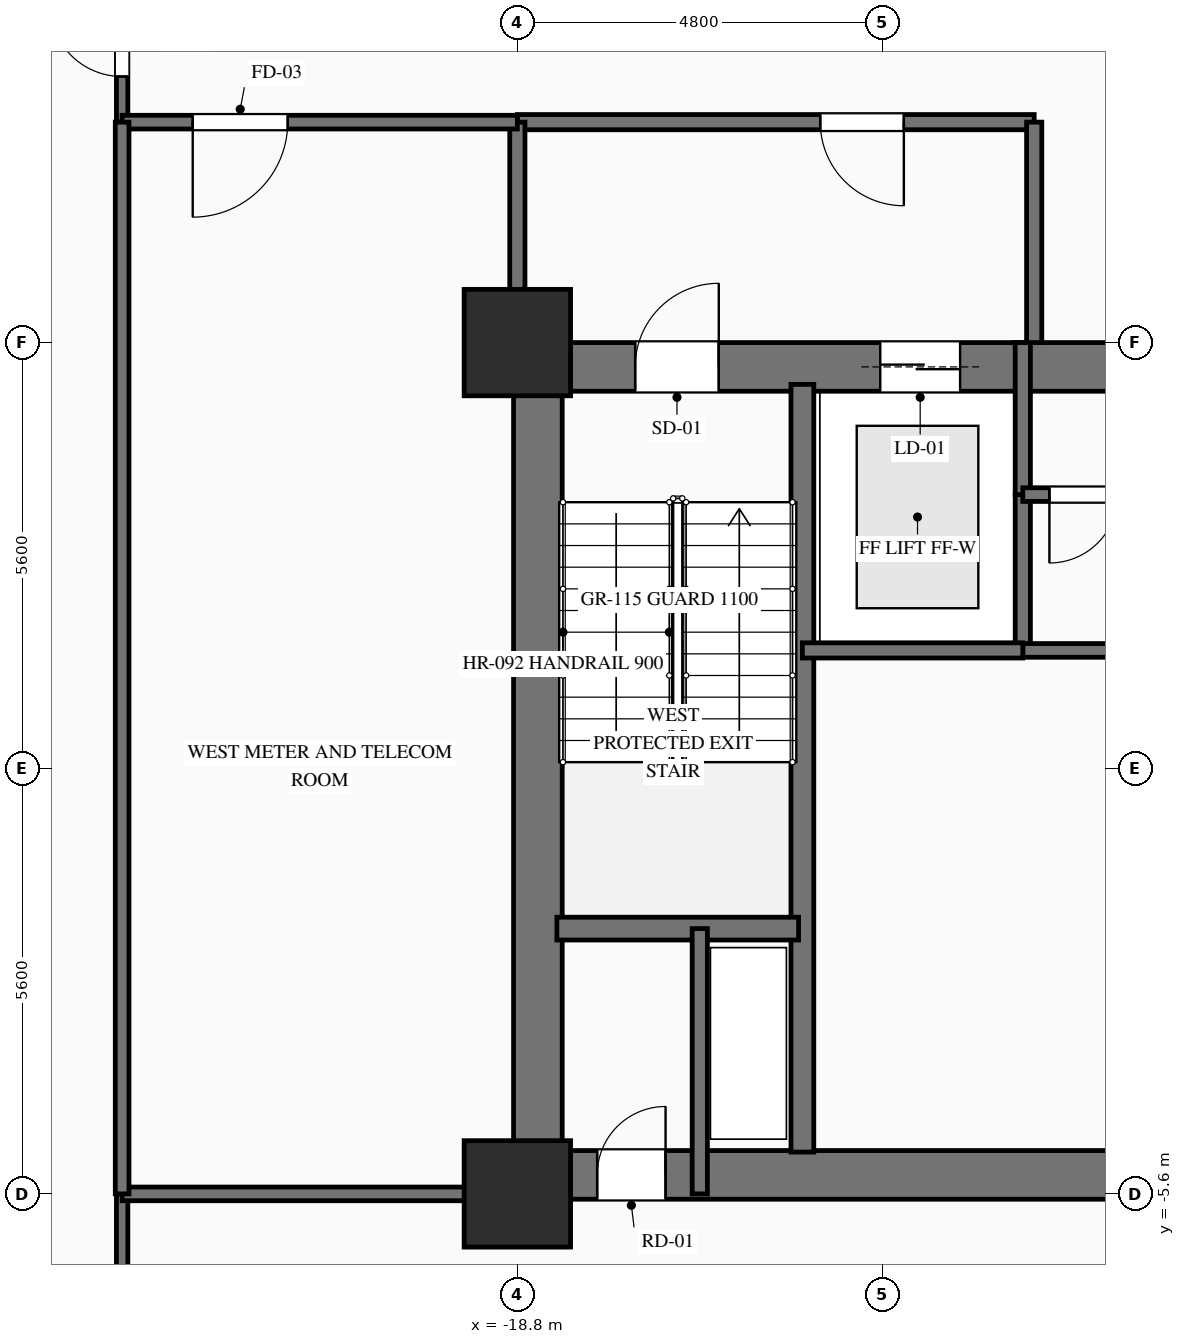
"""IFC4 building model, lengths in metres.
Left out: names, types, materials, properties, quantities, classifications, styles, units other than length and angle.
Written with IfcOpenShell. Run it as: python <this file> out.ifc"""

import sys

from ifc_helpers import new_model, si_unit, direction, frame, frame_2d, origin, origin_2d, place, context, subcontext, project, spatial, rectangle, extrude, element, fill, save


model = new_model("IFC4")
c1 = context("Model", 3, precision=1e-05, world=origin(), true_north=direction((0.0, 1.0)))
c2 = subcontext(c1, "Body", "Model", "MODEL_VIEW")
j1 = project(units=[si_unit("LENGTHUNIT", "METRE"), si_unit("PLANEANGLEUNIT", "RADIAN")], contexts=[c1])
p1 = place(None, origin())
s1 = spatial("IfcSite", under=j1, at=p1, CompositionType="ELEMENT")
p2 = place(p1, origin())
s2 = spatial("IfcBuilding", under=s1, at=p2, CompositionType="ELEMENT")
p3 = place(p2, frame((0.0, 0.0, -4.5)))
s3 = spatial("IfcBuildingStorey", under=s2, at=p3, CompositionType="ELEMENT", Elevation=-4.5)
for number, where, z_axis, x_axis in (
    (1, (-18.8, -5.6, 0.0), (0.0, 0.0, 1.0), (1.0, 0.0, 0.0)),
    (2, (-18.8, 5.6, 0.0), (0.0, 0.0, 1.0), (1.0, 0.0, 0.0)),
):
    element("IfcColumn", number, at=place(p3, frame(where, z_axis=z_axis, x_axis=x_axis)), inside=s3, PredefinedType="COLUMN", context=c2, shape_type="SweptSolid", body=[
        extrude(rectangle(XDim=1.4, YDim=1.4, at=origin_2d()), origin(), (0.0, 0.0, 1.0), 4.5),
    ])
p4 = place(p3, frame((-18.8, 5.28, 0.0), z_axis=(0.0, 0.0, 1.0), x_axis=(1.0, 0.0, 0.0)))
e3 = element("IfcWall", 3, at=p4, inside=s3, PredefinedType="SHEAR", context=c2, shape_type="SweptSolid", body=[
    extrude(rectangle(XDim=9.6, YDim=0.64, at=frame_2d((4.8, 0.0))), origin(), (0.0, 0.0, 1.0), 4.16),
])
p5 = place(p4, frame((1.55, 0.0, 0.0)))
e4 = element("IfcOpeningElement", 4, at=p5, cuts=e3, PredefinedType="OPENING", context=c2, shape_type="SweptSolid", body=[
    extrude(rectangle(XDim=1.1, YDim=2.15, at=frame_2d((0.55, 1.075))), frame((0.0, 0.33, 0.0), z_axis=(0.0, -1.0, 0.0), x_axis=(1.0, 0.0, 0.0)), (0.0, 0.0, 1.0), 0.66),
])
p6 = place(p4, frame((4.775, 0.0, 0.0)))
e5 = element("IfcOpeningElement", 5, at=p6, cuts=e3, PredefinedType="OPENING", context=c2, shape_type="SweptSolid", body=[
    extrude(rectangle(XDim=1.05, YDim=2.1, at=frame_2d((0.525, 1.05))), frame((0.0, 0.33, 0.0), z_axis=(0.0, -1.0, 0.0), x_axis=(1.0, 0.0, 0.0)), (0.0, 0.0, 1.0), 0.66),
])
p7 = place(p3, frame((-18.8, -5.35, 0.0), z_axis=(0.0, 0.0, 1.0), x_axis=(1.0, 0.0, 0.0)))
e6 = element("IfcWall", 6, at=p7, inside=s3, PredefinedType="SHEAR", context=c2, shape_type="SweptSolid", body=[
    extrude(rectangle(XDim=9.6, YDim=0.64, at=frame_2d((4.8, 0.0))), origin(), (0.0, 0.0, 1.0), 4.16),
])
p8 = place(p7, frame((1.05, 0.0, 0.0)))
e7 = element("IfcOpeningElement", 7, at=p8, cuts=e6, PredefinedType="OPENING", context=c2, shape_type="SweptSolid", body=[
    extrude(rectangle(XDim=0.9, YDim=2.1, at=frame_2d((0.45, 1.05))), frame((0.0, 0.33, 0.0), z_axis=(0.0, -1.0, 0.0), x_axis=(1.0, 0.0, 0.0)), (0.0, 0.0, 1.0), 0.66),
])
p9 = place(p3, frame((-18.53, -5.05, 0.0), z_axis=(0.0, 0.0, 1.0), x_axis=(0.0, 1.0, 0.0)))
e8 = element("IfcWall", 8, at=p9, inside=s3, PredefinedType="SHEAR", context=c2, shape_type="SweptSolid", body=[
    extrude(rectangle(XDim=10.1, YDim=0.64, at=frame_2d((5.05, 0.0))), origin(), (0.0, 0.0, 1.0), 4.16),
])
p10 = place(p3, frame((-15.05, -5.05, 0.0), z_axis=(0.0, 0.0, 1.0), x_axis=(0.0, 1.0, 0.0)))
e9 = element("IfcWall", 9, at=p10, inside=s3, PredefinedType="SHEAR", context=c2, shape_type="SweptSolid", body=[
    extrude(rectangle(XDim=10.1, YDim=0.3, at=frame_2d((5.05, 0.0))), origin(), (0.0, 0.0, 1.0), 4.16),
])
p11 = place(p3, frame((-18.28, -2.11, 0.0), z_axis=(0.0, 0.0, 1.0), x_axis=(1.0, 0.0, 0.0)))
e10 = element("IfcWall", 10, at=p11, inside=s3, PredefinedType="SHEAR", context=c2, shape_type="SweptSolid", body=[
    extrude(rectangle(XDim=3.18, YDim=0.3, at=frame_2d((1.59, 0.0))), origin(), (0.0, 0.0, 1.0), 4.16),
])
p12 = place(p3, frame((-16.4, -5.6, 0.0), z_axis=(0.0, 0.0, 1.0), x_axis=(0.0, 1.0, 0.0)))
e11 = element("IfcWall", 11, at=p12, inside=s3, PredefinedType="PARTITIONING", context=c2, shape_type="SweptSolid", body=[
    extrude(rectangle(XDim=3.49, YDim=0.2, at=frame_2d((1.745, 0.0))), origin(), (0.0, 0.0, 1.0), 4.16),
])
p13 = place(p3, frame((-12.15, 1.55, 0.0), z_axis=(0.0, 0.0, 1.0), x_axis=(0.0, 1.0, 0.0)))
e12 = element("IfcWall", 12, at=p13, inside=s3, PredefinedType="PARTITIONING", context=c2, shape_type="SweptSolid", body=[
    extrude(rectangle(XDim=2.05, YDim=0.2, at=frame_2d((1.025, 0.0))), origin(), (0.0, 0.0, 1.0), 4.16),
])
p14 = place(p3, frame((-12.15, 3.6, 0.0), z_axis=(0.0, 0.0, 1.0), x_axis=(0.0, 1.0, 0.0)))
e13 = element("IfcWall", 13, at=p14, inside=s3, PredefinedType="PARTITIONING", context=c2, shape_type="SweptSolid", body=[
    extrude(rectangle(XDim=2.0, YDim=0.2, at=frame_2d((1.0, 0.0))), origin(), (0.0, 0.0, 1.0), 4.16),
])
p15 = place(p3, frame((-12.0, 8.5, 0.0), z_axis=(0.0, 0.0, 1.0), x_axis=(-1.0, 0.0, 0.0)))
e14 = element("IfcWall", 14, at=p15, inside=s3, PredefinedType="PARTITIONING", context=c2, shape_type="SweptSolid", body=[
    extrude(rectangle(XDim=6.8, YDim=0.2, at=frame_2d((3.4, 0.0))), origin(), (0.0, 0.0, 1.0), 4.16),
])
p16 = place(p15, frame((1.715, 0.0, 0.0)))
e15 = element("IfcOpeningElement", 15, at=p16, cuts=e14, PredefinedType="OPENING", context=c2, shape_type="SweptSolid", body=[
    extrude(rectangle(XDim=1.1, YDim=2.15, at=frame_2d((0.55, 1.075))), frame((0.0, 0.11, 0.0), z_axis=(0.0, -1.0, 0.0), x_axis=(1.0, 0.0, 0.0)), (0.0, 0.0, 1.0), 0.22),
])
p17 = place(p3, frame((-12.0, 5.6, 0.0), z_axis=(0.0, 0.0, 1.0), x_axis=(0.0, 1.0, 0.0)))
e16 = element("IfcWall", 16, at=p17, inside=s3, PredefinedType="PARTITIONING", context=c2, shape_type="SweptSolid", body=[
    extrude(rectangle(XDim=2.9, YDim=0.2, at=frame_2d((1.45, 0.0))), origin(), (0.0, 0.0, 1.0), 4.16),
])
p18 = place(p3, frame((-18.8, 8.5, 0.0), z_axis=(0.0, 0.0, 1.0), x_axis=(0.0, -1.0, 0.0)))
e17 = element("IfcWall", 17, at=p18, inside=s3, PredefinedType="PARTITIONING", context=c2, shape_type="SweptSolid", body=[
    extrude(rectangle(XDim=2.9, YDim=0.2, at=frame_2d((1.45, 0.0))), origin(), (0.0, 0.0, 1.0), 3.645),
])
p19 = place(p3, frame((-9.2, 3.6, 0.0), z_axis=(0.0, 0.0, 1.0), x_axis=(-1.0, 0.0, 0.0)))
e18 = element("IfcWall", 18, at=p19, inside=s3, PredefinedType="PARTITIONING", context=c2, shape_type="SweptSolid", body=[
    extrude(rectangle(XDim=2.95, YDim=0.18, at=frame_2d((1.475, 0.0))), origin(), (0.0, 0.0, 1.0), 4.16),
])
p20 = place(p19, frame((1.7, 0.0, 0.0)))
e19 = element("IfcOpeningElement", 19, at=p20, cuts=e18, PredefinedType="OPENING", context=c2, shape_type="SweptSolid", body=[
    extrude(rectangle(XDim=0.9, YDim=2.1, at=frame_2d((0.45, 1.05))), frame((0.0, 0.1, 0.0), z_axis=(0.0, -1.0, 0.0), x_axis=(1.0, 0.0, 0.0)), (0.0, 0.0, 1.0), 0.2),
])
p21 = place(p3, frame((-12.15, 1.55, 0.0), z_axis=(0.0, 0.0, 1.0), x_axis=(1.0, 0.0, 0.0)))
e20 = element("IfcWall", 20, at=p21, inside=s3, PredefinedType="PARTITIONING", context=c2, shape_type="SweptSolid", body=[
    extrude(rectangle(XDim=2.95, YDim=0.18, at=frame_2d((1.475, 0.0))), origin(), (0.0, 0.0, 1.0), 4.16),
])
p22 = place(p3, frame((-24.0, 8.5, 0.0), z_axis=(0.0, 0.0, 1.0), x_axis=(0.0, 1.0, 0.0)))
e21 = element("IfcWall", 21, at=p22, inside=s3, PredefinedType="PARTITIONING", context=c2, shape_type="SweptSolid", body=[
    extrude(rectangle(XDim=2.15, YDim=0.15, at=frame_2d((1.075, 0.0))), origin(), (0.0, 0.0, 1.0), 4.16),
])
p23 = place(p22, frame((0.6, 0.0, 0.0)))
e22 = element("IfcOpeningElement", 22, at=p23, cuts=e21, PredefinedType="OPENING", context=c2, shape_type="SweptSolid", body=[
    extrude(rectangle(XDim=0.95, YDim=2.1, at=frame_2d((0.475, 1.05))), frame((0.0, 0.085, 0.0), z_axis=(0.0, -1.0, 0.0), x_axis=(1.0, 0.0, 0.0)), (0.0, 0.0, 1.0), 0.17),
])
p24 = place(p3, frame((-18.8, 8.5, 0.0), z_axis=(0.0, 0.0, 1.0), x_axis=(-1.0, 0.0, 0.0)))
e23 = element("IfcWall", 23, at=p24, inside=s3, PredefinedType="PARTITIONING", context=c2, shape_type="SweptSolid", body=[
    extrude(rectangle(XDim=5.2, YDim=0.18, at=frame_2d((2.6, 0.0))), origin(), (0.0, 0.0, 1.0), 4.16),
])
p25 = place(p24, frame((3.021, 0.0, 0.0)))
e24 = element("IfcOpeningElement", 24, at=p25, cuts=e23, PredefinedType="OPENING", context=c2, shape_type="SweptSolid", body=[
    extrude(rectangle(XDim=1.25, YDim=2.2, at=frame_2d((0.625, 1.1))), frame((0.0, 0.1, 0.0), z_axis=(0.0, -1.0, 0.0), x_axis=(1.0, 0.0, 0.0)), (0.0, 0.0, 1.0), 0.2),
])
p26 = place(p3, frame((-24.0, -7.75, 0.0), z_axis=(0.0, 0.0, 1.0), x_axis=(0.0, 1.0, 0.0)))
e25 = element("IfcWall", 25, at=p26, inside=s3, PredefinedType="PARTITIONING", context=c2, shape_type="SweptSolid", body=[
    extrude(rectangle(XDim=2.15, YDim=0.15, at=frame_2d((1.075, 0.0))), origin(), (0.0, 0.0, 1.0), 4.16),
])
p27 = place(p3, frame((-24.0, -5.6, 0.0), z_axis=(0.0, 0.0, 1.0), x_axis=(1.0, 0.0, 0.0)))
e26 = element("IfcWall", 26, at=p27, inside=s3, PredefinedType="PARTITIONING", context=c2, shape_type="SweptSolid", body=[
    extrude(rectangle(XDim=5.2, YDim=0.18, at=frame_2d((2.6, 0.0))), origin(), (0.0, 0.0, 1.0), 4.16),
])
p28 = place(p3, frame((-24.0, 8.5, 0.0), z_axis=(0.0, 0.0, 1.0), x_axis=(0.0, -1.0, 0.0)))
e27 = element("IfcWall", 27, at=p28, inside=s3, PredefinedType="PARTITIONING", context=c2, shape_type="SweptSolid", body=[
    extrude(rectangle(XDim=14.1, YDim=0.18, at=frame_2d((7.05, 0.0))), origin(), (0.0, 0.0, 1.0), 4.16),
])
p29 = place(p3, frame((-15.05, 1.55, 0.0), z_axis=(0.0, 0.0, 1.0), x_axis=(1.0, 0.0, 0.0)))
e28 = element("IfcWall", 28, at=p29, inside=s3, PredefinedType="PARTITIONING", context=c2, shape_type="SweptSolid", body=[
    extrude(rectangle(XDim=2.9, YDim=0.2, at=frame_2d((1.45, 0.0))), origin(), (0.0, 0.0, 1.0), 4.16),
])
p30 = place(p5, origin())
e29 = element("IfcDoor", 29, at=p30, inside=s3, OperationType="SINGLE_SWING_RIGHT", PredefinedType="DOOR", context=c2, shape_type="SweptSolid", body=[
    extrude(rectangle(XDim=1.1, YDim=2.15, at=frame_2d((0.55, 1.075))), frame((0.0, 0.025, 0.0), z_axis=(0.0, -1.0, 0.0), x_axis=(1.0, 0.0, 0.0)), (0.0, 0.0, 1.0), 0.05),
])
fill(e4, e29)
p31 = place(p6, origin())
e30 = element("IfcDoor", 30, at=p31, inside=s3, OperationType="DOUBLE_DOOR_SLIDING", PredefinedType="DOOR", context=c2, shape_type="SweptSolid", body=[
    extrude(rectangle(XDim=1.05, YDim=2.1, at=frame_2d((0.525, 1.05))), frame((0.0, 0.025, 0.0), z_axis=(0.0, -1.0, 0.0), x_axis=(1.0, 0.0, 0.0)), (0.0, 0.0, 1.0), 0.05),
])
fill(e5, e30)
p32 = place(p8, origin())
e31 = element("IfcDoor", 31, at=p32, inside=s3, OperationType="SINGLE_SWING_RIGHT", PredefinedType="DOOR", context=c2, shape_type="SweptSolid", body=[
    extrude(rectangle(XDim=0.9, YDim=2.1, at=frame_2d((0.45, 1.05))), frame((0.0, 0.025, 0.0), z_axis=(0.0, -1.0, 0.0), x_axis=(1.0, 0.0, 0.0)), (0.0, 0.0, 1.0), 0.05),
])
fill(e7, e31)
p33 = place(p16, origin())
e32 = element("IfcDoor", 32, at=p33, inside=s3, OperationType="SINGLE_SWING_LEFT", PredefinedType="DOOR", context=c2, shape_type="SweptSolid", body=[
    extrude(rectangle(XDim=1.1, YDim=2.15, at=frame_2d((0.55, 1.075))), frame((0.0, 0.025, 0.0), z_axis=(0.0, -1.0, 0.0), x_axis=(1.0, 0.0, 0.0)), (0.0, 0.0, 1.0), 0.05),
])
fill(e15, e32)
p34 = place(p20, origin())
e33 = element("IfcDoor", 33, at=p34, inside=s3, OperationType="SINGLE_SWING_RIGHT", PredefinedType="DOOR", context=c2, shape_type="SweptSolid", body=[
    extrude(rectangle(XDim=0.9, YDim=2.1, at=frame_2d((0.45, 1.05))), frame((0.0, 0.025, 0.0), z_axis=(0.0, -1.0, 0.0), x_axis=(1.0, 0.0, 0.0)), (0.0, 0.0, 1.0), 0.05),
])
fill(e19, e33)
p35 = place(p23, origin())
e34 = element("IfcDoor", 34, at=p35, inside=s3, OperationType="SINGLE_SWING_RIGHT", PredefinedType="DOOR", context=c2, shape_type="SweptSolid", body=[
    extrude(rectangle(XDim=0.95, YDim=2.1, at=frame_2d((0.475, 1.05))), frame((0.0, 0.025, 0.0), z_axis=(0.0, -1.0, 0.0), x_axis=(1.0, 0.0, 0.0)), (0.0, 0.0, 1.0), 0.05),
])
fill(e22, e34)
p36 = place(p25, origin())
e35 = element("IfcDoor", 35, at=p36, inside=s3, OperationType="SINGLE_SWING_RIGHT", PredefinedType="DOOR", context=c2, shape_type="SweptSolid", body=[
    extrude(rectangle(XDim=1.25, YDim=2.2, at=frame_2d((0.625, 1.1))), frame((0.0, 0.025, 0.0), z_axis=(0.0, -1.0, 0.0), x_axis=(1.0, 0.0, 0.0)), (0.0, 0.0, 1.0), 0.05),
])
fill(e24, e35)
save(model, sys.argv[1])
